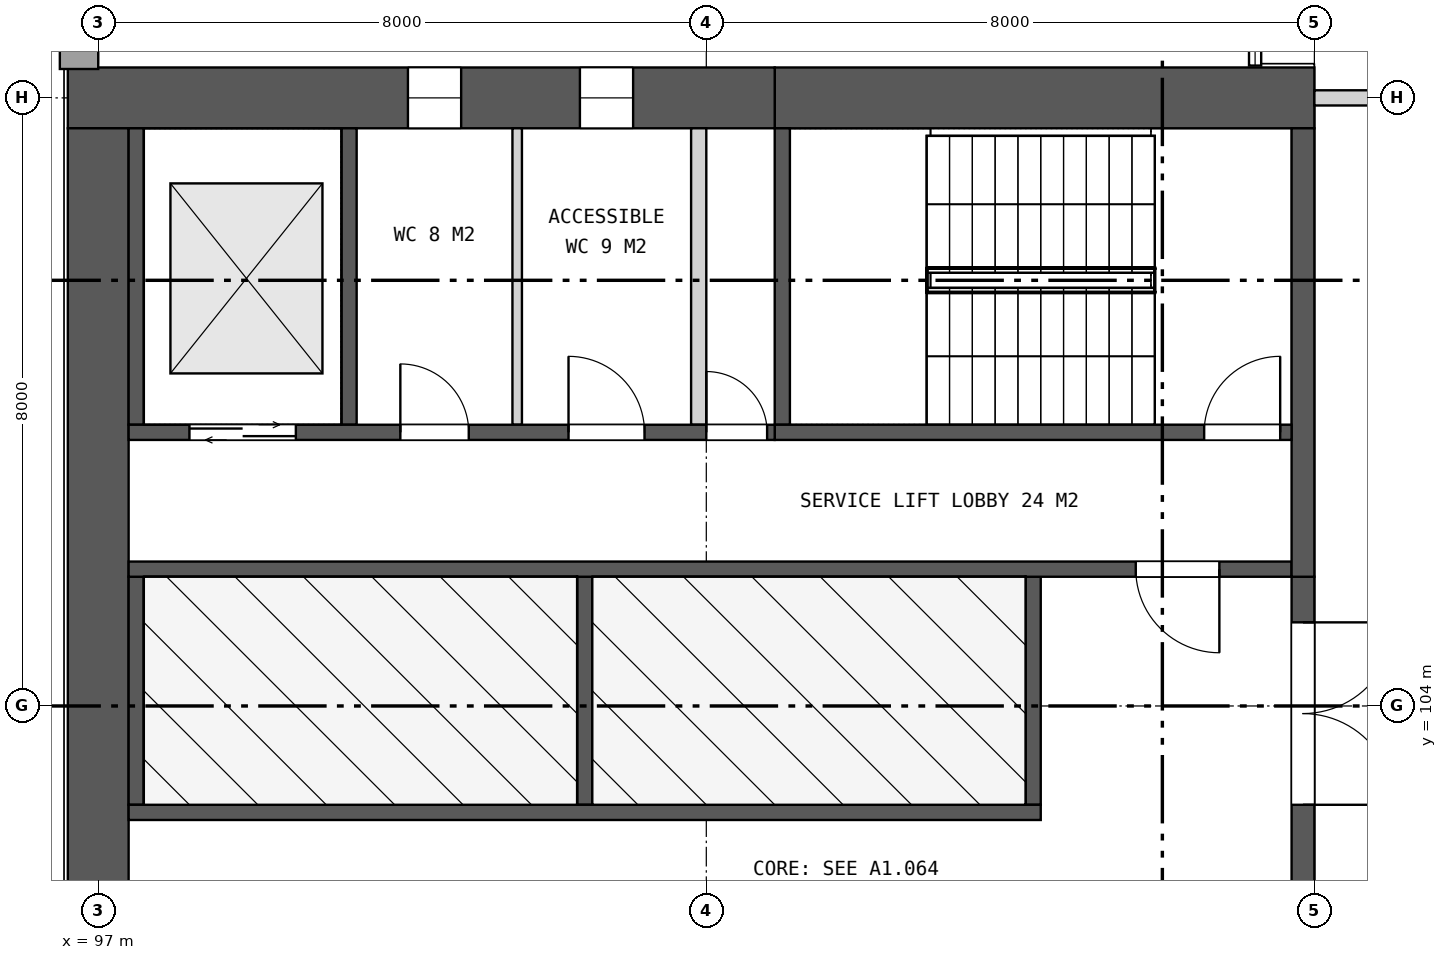
"""IFC4 building model, lengths in metres.
Left out: names, types, materials, properties, quantities, classifications, styles, units other than length and angle.
Written with IfcOpenShell. Run it as: python <this file> out.ifc"""

import sys

from ifc_helpers import new_model, si_unit, direction, frame, frame_2d, origin, place, context, subcontext, project, spatial, rectangle, extrude, element, fill, save


model = new_model("IFC4")
c1 = context("Model", 3, precision=1e-05, world=origin(), true_north=direction((0.0, 1.0)))
c2 = subcontext(c1, "Body", "Model", "MODEL_VIEW")
j1 = project(units=[si_unit("LENGTHUNIT", "METRE"), si_unit("PLANEANGLEUNIT", "RADIAN")], contexts=[c1])
p1 = place(None, origin())
s1 = spatial("IfcSite", under=j1, at=p1, CompositionType="ELEMENT")
p2 = place(p1, origin())
s2 = spatial("IfcBuilding", under=s1, at=p2, CompositionType="ELEMENT")
p3 = place(p2, frame((0.0, 0.0, 47.5)))
s3 = spatial("IfcBuildingStorey", under=s2, at=p3, CompositionType="ELEMENT", Elevation=47.5)
p4 = place(p3, frame((113.0, 112.0, 0.0), z_axis=(0.0, 0.0, 1.0), x_axis=(-1.0, 0.0, 0.0)))
e1 = element("IfcWall", 1, at=p4, inside=s3, PredefinedType="SHEAR", context=c2, shape_type="SweptSolid", body=[
    extrude(rectangle(XDim=7.1, YDim=0.8, at=frame_2d((3.55, 0.0))), origin(), (0.0, 0.0, 1.0), 6.0),
])
p5 = place(p3, frame((105.9, 112.0, 0.0), z_axis=(0.0, 0.0, 1.0), x_axis=(-1.0, 0.0, 0.0)))
e2 = element("IfcWall", 2, at=p5, inside=s3, PredefinedType="SHEAR", context=c2, shape_type="SweptSolid", body=[
    extrude(rectangle(XDim=9.3, YDim=0.8, at=frame_2d((4.65, 0.0))), origin(), (0.0, 0.0, 1.0), 6.0),
])
p6 = place(p5, frame((1.863, 0.0, 1.5)))
e3 = element("IfcOpeningElement", 3, at=p6, cuts=e2, PredefinedType="OPENING", context=c2, shape_type="SweptSolid", body=[
    extrude(rectangle(XDim=0.7, YDim=0.9, at=frame_2d((0.35, 0.45))), frame((0.0, 0.41, 0.0), z_axis=(0.0, -1.0, 0.0), x_axis=(1.0, 0.0, 0.0)), (0.0, 0.0, 1.0), 0.82),
])
p7 = place(p5, frame((4.125, 0.0, 1.5)))
e4 = element("IfcOpeningElement", 4, at=p7, cuts=e2, PredefinedType="OPENING", context=c2, shape_type="SweptSolid", body=[
    extrude(rectangle(XDim=0.7, YDim=0.9, at=frame_2d((0.35, 0.45))), frame((0.0, 0.41, 0.0), z_axis=(0.0, -1.0, 0.0), x_axis=(1.0, 0.0, 0.0)), (0.0, 0.0, 1.0), 0.82),
])
p8 = place(p3, frame((97.0, 111.6, 0.0), z_axis=(0.0, 0.0, 1.0), x_axis=(0.0, -1.0, 0.0)))
e5 = element("IfcWall", 5, at=p8, inside=s3, PredefinedType="SHEAR", context=c2, shape_type="SweptSolid", body=[
    extrude(rectangle(XDim=23.2, YDim=0.8, at=frame_2d((11.6, 0.0))), origin(), (0.0, 0.0, 1.0), 6.0),
])
p9 = place(p8, frame((10.4, 0.0, 0.0)))
e6 = element("IfcOpeningElement", 6, at=p9, cuts=e5, PredefinedType="OPENING", context=c2, shape_type="SweptSolid", body=[
    extrude(rectangle(XDim=2.4, YDim=2.4, at=frame_2d((1.2, 1.2))), frame((0.0, 0.41, 0.0), z_axis=(0.0, -1.0, 0.0), x_axis=(1.0, 0.0, 0.0)), (0.0, 0.0, 1.0), 0.82),
])
p10 = place(p3, frame((112.85, 105.7, 0.0), z_axis=(0.0, 0.0, 1.0), x_axis=(0.0, -1.0, 0.0)))
e7 = element("IfcWall", 7, at=p10, inside=s3, PredefinedType="SHEAR", context=c2, shape_type="SweptSolid", body=[
    extrude(rectangle(XDim=11.4, YDim=0.3, at=frame_2d((5.7, 0.0))), origin(), (0.0, 0.0, 1.0), 6.0),
])
p11 = place(p10, frame((0.6, 0.0, 0.0)))
e8 = element("IfcOpeningElement", 8, at=p11, cuts=e7, PredefinedType="OPENING", context=c2, shape_type="SweptSolid", body=[
    extrude(rectangle(XDim=2.4, YDim=2.4, at=frame_2d((1.2, 1.2))), frame((0.0, 0.16, 0.0), z_axis=(0.0, -1.0, 0.0), x_axis=(1.0, 0.0, 0.0)), (0.0, 0.0, 1.0), 0.32),
])
p12 = place(p10, frame((4.5, 0.0, 0.0)))
e9 = element("IfcOpeningElement", 9, at=p12, cuts=e7, PredefinedType="OPENING", context=c2, shape_type="SweptSolid", body=[
    extrude(rectangle(XDim=2.4, YDim=2.4, at=frame_2d((1.2, 1.2))), frame((0.0, 0.16, 0.0), z_axis=(0.0, -1.0, 0.0), x_axis=(1.0, 0.0, 0.0)), (0.0, 0.0, 1.0), 0.32),
])
p13 = place(p10, frame((8.4, 0.0, 0.0)))
e10 = element("IfcOpeningElement", 10, at=p13, cuts=e7, PredefinedType="OPENING", context=c2, shape_type="SweptSolid", body=[
    extrude(rectangle(XDim=2.4, YDim=2.4, at=frame_2d((1.2, 1.2))), frame((0.0, 0.16, 0.0), z_axis=(0.0, -1.0, 0.0), x_axis=(1.0, 0.0, 0.0)), (0.0, 0.0, 1.0), 0.32),
])
for number, where, z_axis, x_axis in (
    (11, (109.3, 105.7, 0.0), (0.0, 0.0, 1.0), (0.0, -1.0, 0.0)),
    (12, (103.4, 105.7, 0.0), (0.0, 0.0, 1.0), (0.0, -1.0, 0.0)),
    (13, (97.5, 105.7, 0.0), (0.0, 0.0, 1.0), (0.0, -1.0, 0.0)),
):
    element("IfcWall", number, at=place(p3, frame(where, z_axis=z_axis, x_axis=x_axis)), inside=s3, PredefinedType="SHEAR", context=c2, shape_type="SweptSolid", body=[
        extrude(rectangle(XDim=3.0, YDim=0.2, at=frame_2d((1.5, 0.0))), origin(), (0.0, 0.0, 1.0), 6.0),
    ])
p14 = place(p3, frame((109.4, 102.6, 0.0), z_axis=(0.0, 0.0, 1.0), x_axis=(-1.0, 0.0, 0.0)))
e14 = element("IfcWall", 14, at=p14, inside=s3, PredefinedType="SHEAR", context=c2, shape_type="SweptSolid", body=[
    extrude(rectangle(XDim=12.0, YDim=0.2, at=frame_2d((6.0, 0.0))), origin(), (0.0, 0.0, 1.0), 6.0),
])
p15 = place(p3, frame((112.7, 105.8, 0.0), z_axis=(0.0, 0.0, 1.0), x_axis=(-1.0, 0.0, 0.0)))
e15 = element("IfcWall", 15, at=p15, inside=s3, PredefinedType="SHEAR", context=c2, shape_type="SweptSolid", body=[
    extrude(rectangle(XDim=15.3, YDim=0.2, at=frame_2d((7.65, 0.0))), origin(), (0.0, 0.0, 1.0), 6.0),
])
p16 = place(p15, frame((0.95, 0.0, 0.0)))
e16 = element("IfcOpeningElement", 16, at=p16, cuts=e15, PredefinedType="OPENING", context=c2, shape_type="SweptSolid", body=[
    extrude(rectangle(XDim=1.1, YDim=2.1, at=frame_2d((0.55, 1.05))), frame((0.0, 0.11, 0.0), z_axis=(0.0, -1.0, 0.0), x_axis=(1.0, 0.0, 0.0)), (0.0, 0.0, 1.0), 0.22),
])
p17 = place(p3, frame((112.85, 111.6, 0.0), z_axis=(0.0, 0.0, 1.0), x_axis=(0.0, -1.0, 0.0)))
e17 = element("IfcWall", 17, at=p17, inside=s3, PredefinedType="SHEAR", context=c2, shape_type="SweptSolid", body=[
    extrude(rectangle(XDim=5.9, YDim=0.3, at=frame_2d((2.95, 0.0))), origin(), (0.0, 0.0, 1.0), 6.0),
])
for number, where, z_axis, x_axis in (
    (18, (106.0, 111.6, 0.0), (0.0, 0.0, 1.0), (0.0, -1.0, 0.0)),
    (19, (100.3, 111.6, 0.0), (0.0, 0.0, 1.0), (0.0, -1.0, 0.0)),
    (20, (97.5, 111.6, 0.0), (0.0, 0.0, 1.0), (0.0, -1.0, 0.0)),
):
    element("IfcWall", number, at=place(p3, frame(where, z_axis=z_axis, x_axis=x_axis)), inside=s3, PredefinedType="SHEAR", context=c2, shape_type="SweptSolid", body=[
        extrude(rectangle(XDim=3.9, YDim=0.2, at=frame_2d((1.95, 0.0))), origin(), (0.0, 0.0, 1.0), 6.0),
    ])
p18 = place(p3, frame((104.9, 111.6, 0.0), z_axis=(0.0, 0.0, 1.0), x_axis=(0.0, -1.0, 0.0)))
e21 = element("IfcWall", 21, at=p18, inside=s3, PredefinedType="PARTITIONING", context=c2, shape_type="SweptSolid", body=[
    extrude(rectangle(XDim=3.9, YDim=0.2, at=frame_2d((1.95, 0.0))), origin(), (0.0, 0.0, 1.0), 6.0),
])
p19 = place(p3, frame((102.512, 111.6, 0.0), z_axis=(0.0, 0.0, 1.0), x_axis=(0.0, -1.0, 0.0)))
e22 = element("IfcWall", 22, at=p19, inside=s3, PredefinedType="PARTITIONING", context=c2, shape_type="SweptSolid", body=[
    extrude(rectangle(XDim=3.9, YDim=0.125, at=frame_2d((1.95, 0.0))), origin(), (0.0, 0.0, 1.0), 6.0),
])
p20 = place(p3, frame((112.7, 107.6, 0.0), z_axis=(0.0, 0.0, 1.0), x_axis=(-1.0, 0.0, 0.0)))
e23 = element("IfcWall", 23, at=p20, inside=s3, PredefinedType="SHEAR", context=c2, shape_type="SweptSolid", body=[
    extrude(rectangle(XDim=6.8, YDim=0.2, at=frame_2d((3.4, 0.0))), origin(), (0.0, 0.0, 1.0), 6.0),
])
p21 = place(p20, frame((0.15, 0.0, 0.0)))
e24 = element("IfcOpeningElement", 24, at=p21, cuts=e23, PredefinedType="OPENING", context=c2, shape_type="SweptSolid", body=[
    extrude(rectangle(XDim=1.0, YDim=2.1, at=frame_2d((0.5, 1.05))), frame((0.0, 0.11, 0.0), z_axis=(0.0, -1.0, 0.0), x_axis=(1.0, 0.0, 0.0)), (0.0, 0.0, 1.0), 0.22),
])
p22 = place(p3, frame((105.9, 107.6, 0.0), z_axis=(0.0, 0.0, 1.0), x_axis=(-1.0, 0.0, 0.0)))
e25 = element("IfcWall", 25, at=p22, inside=s3, PredefinedType="SHEAR", context=c2, shape_type="SweptSolid", body=[
    extrude(rectangle(XDim=8.5, YDim=0.2, at=frame_2d((4.25, 0.0))), origin(), (0.0, 0.0, 1.0), 6.0),
])
p23 = place(p22, frame((0.1, 0.0, 0.0)))
e26 = element("IfcOpeningElement", 26, at=p23, cuts=e25, PredefinedType="OPENING", context=c2, shape_type="SweptSolid", body=[
    extrude(rectangle(XDim=0.8, YDim=2.1, at=frame_2d((0.4, 1.05))), frame((0.0, 0.11, 0.0), z_axis=(0.0, -1.0, 0.0), x_axis=(1.0, 0.0, 0.0)), (0.0, 0.0, 1.0), 0.22),
])
p24 = place(p22, frame((1.713, 0.0, 0.0)))
e27 = element("IfcOpeningElement", 27, at=p24, cuts=e25, PredefinedType="OPENING", context=c2, shape_type="SweptSolid", body=[
    extrude(rectangle(XDim=1.0, YDim=2.1, at=frame_2d((0.5, 1.05))), frame((0.0, 0.11, 0.0), z_axis=(0.0, -1.0, 0.0), x_axis=(1.0, 0.0, 0.0)), (0.0, 0.0, 1.0), 0.22),
])
p25 = place(p22, frame((4.025, 0.0, 0.0)))
e28 = element("IfcOpeningElement", 28, at=p25, cuts=e25, PredefinedType="OPENING", context=c2, shape_type="SweptSolid", body=[
    extrude(rectangle(XDim=0.9, YDim=2.1, at=frame_2d((0.45, 1.05))), frame((0.0, 0.11, 0.0), z_axis=(0.0, -1.0, 0.0), x_axis=(1.0, 0.0, 0.0)), (0.0, 0.0, 1.0), 0.22),
])
p26 = place(p22, frame((6.3, 0.0, 0.0)))
e29 = element("IfcOpeningElement", 29, at=p26, cuts=e25, PredefinedType="OPENING", context=c2, shape_type="SweptSolid", body=[
    extrude(rectangle(XDim=1.4, YDim=2.1, at=frame_2d((0.7, 1.05))), frame((0.0, 0.11, 0.0), z_axis=(0.0, -1.0, 0.0), x_axis=(1.0, 0.0, 0.0)), (0.0, 0.0, 1.0), 0.22),
])
p27 = place(p3, frame((96.495, 112.54, 0.0), z_axis=(0.0, 0.0, 1.0), x_axis=(1.0, 0.0, 0.0)))
e30 = element("IfcWall", 30, at=p27, inside=s3, PredefinedType="SOLIDWALL", context=c2, shape_type="SweptSolid", body=[
    extrude(rectangle(XDim=0.505, YDim=0.32, at=frame_2d((0.252, 0.0))), origin(), (0.0, 0.0, 1.0), 5.72),
])
p28 = place(p3, frame((113.0, 112.0, 0.0), z_axis=(0.0, 0.0, 1.0), x_axis=(1.0, 0.0, 0.0)))
e31 = element("IfcWall", 31, at=p28, inside=s3, PredefinedType="PARTITIONING", context=c2, shape_type="SweptSolid", body=[
    extrude(rectangle(XDim=7.4, YDim=0.2, at=frame_2d((3.7, 0.0))), origin(), (0.0, 0.0, 1.0), 5.256),
])
p29 = place(p28, frame((3.1, 0.0, 0.0)))
e32 = element("IfcOpeningElement", 32, at=p29, cuts=e31, PredefinedType="OPENING", context=c2, shape_type="SweptSolid", body=[
    extrude(rectangle(XDim=1.8, YDim=2.4, at=frame_2d((0.9, 1.2))), frame((0.0, 0.11, 0.0), z_axis=(0.0, -1.0, 0.0), x_axis=(1.0, 0.0, 0.0)), (0.0, 0.0, 1.0), 0.22),
])
p30 = place(p6, origin())
e33 = element("IfcWindow", 33, at=p30, inside=s3, PartitioningType="SINGLE_PANEL", PredefinedType="WINDOW", context=c2, shape_type="SweptSolid", body=[
    extrude(rectangle(XDim=0.7, YDim=0.9, at=frame_2d((0.35, 0.45))), frame((0.0, 0.03, 0.0), z_axis=(0.0, -1.0, 0.0), x_axis=(1.0, 0.0, 0.0)), (0.0, 0.0, 1.0), 0.06),
])
fill(e3, e33)
p31 = place(p7, origin())
e34 = element("IfcWindow", 34, at=p31, inside=s3, PartitioningType="SINGLE_PANEL", PredefinedType="WINDOW", context=c2, shape_type="SweptSolid", body=[
    extrude(rectangle(XDim=0.7, YDim=0.9, at=frame_2d((0.35, 0.45))), frame((0.0, 0.03, 0.0), z_axis=(0.0, -1.0, 0.0), x_axis=(1.0, 0.0, 0.0)), (0.0, 0.0, 1.0), 0.06),
])
fill(e4, e34)
p32 = place(p11, origin())
e35 = element("IfcDoor", 35, at=p32, inside=s3, OperationType="DOUBLE_DOOR_SINGLE_SWING", PredefinedType="DOOR", context=c2, shape_type="SweptSolid", body=[
    extrude(rectangle(XDim=2.4, YDim=2.4, at=frame_2d((1.2, 1.2))), frame((0.0, 0.025, 0.0), z_axis=(0.0, -1.0, 0.0), x_axis=(1.0, 0.0, 0.0)), (0.0, 0.0, 1.0), 0.05),
])
fill(e8, e35)
p33 = place(p16, origin())
e36 = element("IfcDoor", 36, at=p33, inside=s3, OperationType="SINGLE_SWING_LEFT", PredefinedType="DOOR", context=c2, shape_type="SweptSolid", body=[
    extrude(rectangle(XDim=1.1, YDim=2.1, at=frame_2d((0.55, 1.05))), frame((0.0, 0.025, 0.0), z_axis=(0.0, -1.0, 0.0), x_axis=(1.0, 0.0, 0.0)), (0.0, 0.0, 1.0), 0.05),
])
fill(e16, e36)
p34 = place(p21, frame((1.0, 0.0, 0.0), z_axis=(0.0, 0.0, 1.0), x_axis=(-1.0, 0.0, 0.0)))
e37 = element("IfcDoor", 37, at=p34, inside=s3, OperationType="SINGLE_SWING_RIGHT", PredefinedType="DOOR", context=c2, shape_type="SweptSolid", body=[
    extrude(rectangle(XDim=1.0, YDim=2.1, at=frame_2d((0.5, 1.05))), frame((0.0, 0.025, 0.0), z_axis=(0.0, -1.0, 0.0), x_axis=(1.0, 0.0, 0.0)), (0.0, 0.0, 1.0), 0.05),
])
fill(e24, e37)
p35 = place(p23, frame((0.8, 0.0, 0.0), z_axis=(0.0, 0.0, 1.0), x_axis=(-1.0, 0.0, 0.0)))
e38 = element("IfcDoor", 38, at=p35, inside=s3, OperationType="SINGLE_SWING_LEFT", PredefinedType="DOOR", context=c2, shape_type="SweptSolid", body=[
    extrude(rectangle(XDim=0.8, YDim=2.1, at=frame_2d((0.4, 1.05))), frame((0.0, 0.025, 0.0), z_axis=(0.0, -1.0, 0.0), x_axis=(1.0, 0.0, 0.0)), (0.0, 0.0, 1.0), 0.05),
])
fill(e26, e38)
p36 = place(p24, frame((1.0, 0.0, 0.0), z_axis=(0.0, 0.0, 1.0), x_axis=(-1.0, 0.0, 0.0)))
e39 = element("IfcDoor", 39, at=p36, inside=s3, OperationType="SINGLE_SWING_LEFT", PredefinedType="DOOR", context=c2, shape_type="SweptSolid", body=[
    extrude(rectangle(XDim=1.0, YDim=2.1, at=frame_2d((0.5, 1.05))), frame((0.0, 0.025, 0.0), z_axis=(0.0, -1.0, 0.0), x_axis=(1.0, 0.0, 0.0)), (0.0, 0.0, 1.0), 0.05),
])
fill(e27, e39)
p37 = place(p25, frame((0.9, 0.0, 0.0), z_axis=(0.0, 0.0, 1.0), x_axis=(-1.0, 0.0, 0.0)))
e40 = element("IfcDoor", 40, at=p37, inside=s3, OperationType="SINGLE_SWING_LEFT", PredefinedType="DOOR", context=c2, shape_type="SweptSolid", body=[
    extrude(rectangle(XDim=0.9, YDim=2.1, at=frame_2d((0.45, 1.05))), frame((0.0, 0.025, 0.0), z_axis=(0.0, -1.0, 0.0), x_axis=(1.0, 0.0, 0.0)), (0.0, 0.0, 1.0), 0.05),
])
fill(e28, e40)
p38 = place(p26, origin())
e41 = element("IfcDoor", 41, at=p38, inside=s3, OperationType="DOUBLE_DOOR_SLIDING", PredefinedType="DOOR", context=c2, shape_type="SweptSolid", body=[
    extrude(rectangle(XDim=1.4, YDim=2.1, at=frame_2d((0.7, 1.05))), frame((0.0, 0.025, 0.0), z_axis=(0.0, -1.0, 0.0), x_axis=(1.0, 0.0, 0.0)), (0.0, 0.0, 1.0), 0.05),
])
fill(e29, e41)
save(model, sys.argv[1])
